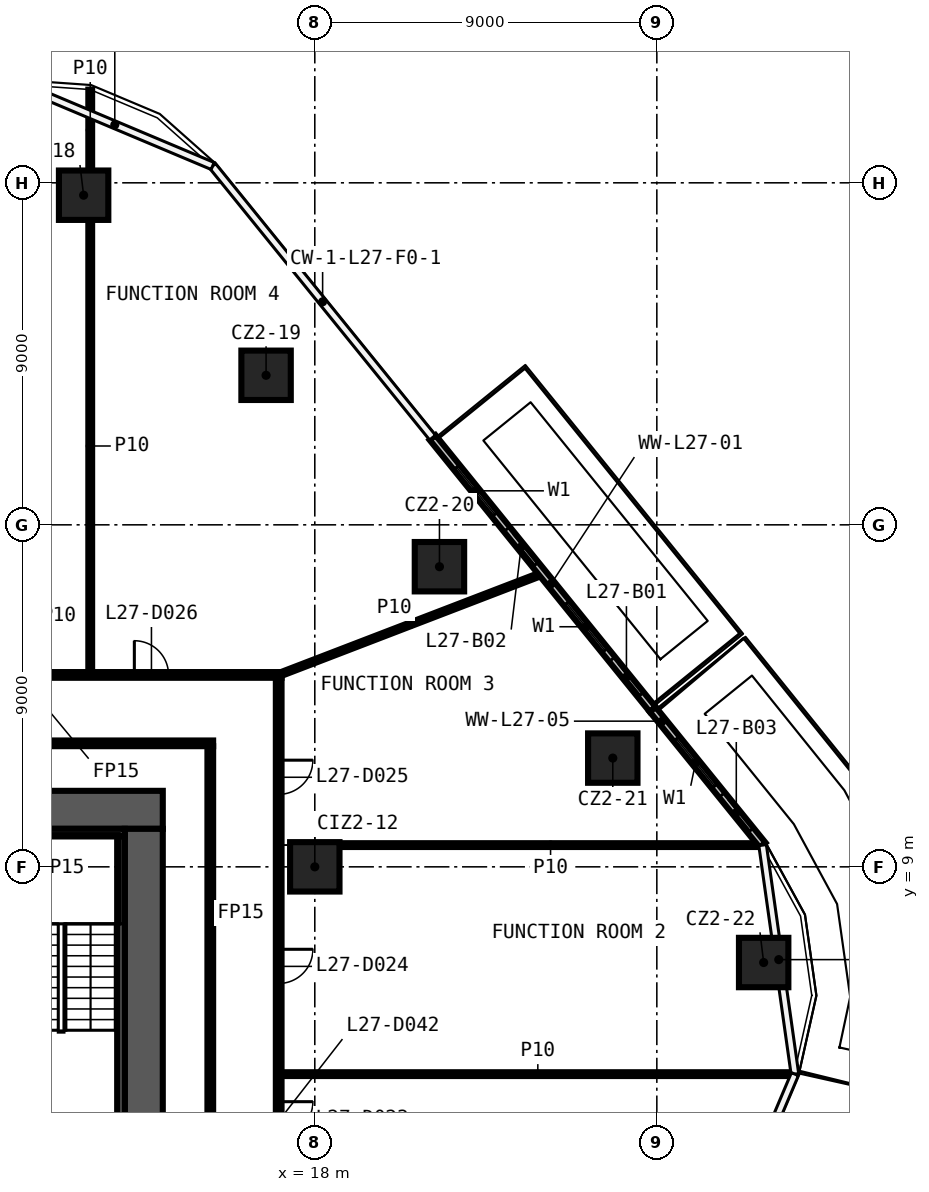
"""IFC4 building model, lengths in metres.
Left out: names, types, materials, properties, quantities, classifications, styles, units other than length and angle.
Written with IfcOpenShell. Run it as: python <this file> out.ifc"""

import sys

from ifc_helpers import new_model, si_unit, direction, frame, frame_2d, origin, origin_2d, place, context, subcontext, project, spatial, rectangle, extrude, element, fill, save


model = new_model("IFC4")
c1 = context("Model", 3, precision=1e-05, world=origin(), true_north=direction((0.0, 1.0)))
c2 = subcontext(c1, "Body", "Model", "MODEL_VIEW")
j1 = project(units=[si_unit("LENGTHUNIT", "METRE"), si_unit("PLANEANGLEUNIT", "RADIAN")], contexts=[c1])
p1 = place(None, origin())
s1 = spatial("IfcSite", under=j1, at=p1, CompositionType="ELEMENT")
p2 = place(p1, origin())
s2 = spatial("IfcBuilding", under=s1, at=p2, CompositionType="ELEMENT")
p3 = place(p2, frame((0.0, 0.0, 124.8)))
s3 = spatial("IfcBuildingStorey", under=s2, at=p3, CompositionType="ELEMENT", Elevation=124.8)
for number, where, z_axis, x_axis in (
    (1, (11.917, 26.674, 0.0), (0.0, 0.0, 1.0), (1.0, 0.0, 0.0)),
    (2, (16.718, 21.935, 0.0), (0.0, 0.0, 1.0), (1.0, 0.0, 0.0)),
    (3, (21.28, 16.898, 0.0), (0.0, 0.0, 1.0), (1.0, 0.0, 0.0)),
    (4, (25.841, 11.862, 0.0), (0.0, 0.0, 1.0), (1.0, 0.0, 0.0)),
    (5, (29.811, 6.482, 0.0), (0.0, 0.0, 1.0), (1.0, 0.0, 0.0)),
    (6, (18.0, 9.0, 0.0), (0.0, 0.0, 1.0), (1.0, 0.0, 0.0)),
):
    element("IfcColumn", number, at=place(p3, frame(where, z_axis=z_axis, x_axis=x_axis)), inside=s3, PredefinedType="COLUMN", context=c2, shape_type="SweptSolid", body=[
        extrude(rectangle(XDim=1.3, YDim=1.3, at=origin_2d()), origin(), (0.0, 0.0, 1.0), 3.3),
    ])
p4 = place(p3, frame((17.125, 3.545, 0.0), z_axis=(0.0, 0.0, 1.0), x_axis=(1.0, 0.0, 0.0)))
e7 = element("IfcWall", 7, at=p4, inside=s3, PredefinedType="PARTITIONING", context=c2, shape_type="SweptSolid", body=[
    extrude(rectangle(XDim=13.487, YDim=0.1, at=frame_2d((6.743, 0.0))), origin(), (0.0, 0.0, 1.0), 3.3),
])
p5 = place(p3, frame((18.65, 9.572, 0.0), z_axis=(0.0, 0.0, 1.0), x_axis=(1.0, 0.0, 0.0)))
e8 = element("IfcWall", 8, at=p5, inside=s3, PredefinedType="PARTITIONING", context=c2, shape_type="SweptSolid", body=[
    extrude(rectangle(XDim=11.107, YDim=0.1, at=frame_2d((5.554, 0.0))), origin(), (0.0, 0.0, 1.0), 3.3),
])
p6 = place(p3, frame((3.525, 12.25, 0.0), z_axis=(0.0, 0.0, 1.0), x_axis=(1.0, 0.0, 0.0)))
e9 = element("IfcWall", 9, at=p6, inside=s3, PredefinedType="PARTITIONING", context=c2, shape_type="SweptSolid", body=[
    extrude(rectangle(XDim=11.8, YDim=0.15, at=frame_2d((5.9, 0.0))), origin(), (0.0, 0.0, 1.0), 3.3),
])
p7 = place(p3, frame((-17.125, 14.05, 0.0), z_axis=(0.0, 0.0, 1.0), x_axis=(1.0, 0.0, 0.0)))
e10 = element("IfcWall", 10, at=p7, inside=s3, PredefinedType="PARTITIONING", context=c2, shape_type="SweptSolid", body=[
    extrude(rectangle(XDim=34.25, YDim=0.15, at=frame_2d((17.125, 0.0))), origin(), (0.0, 0.0, 1.0), 3.3),
])
p8 = place(p7, frame((30.377, 0.0, 0.0)))
e11 = element("IfcOpeningElement", 11, at=p8, cuts=e10, PredefinedType="OPENING", context=c2, shape_type="SweptSolid", body=[
    extrude(rectangle(XDim=0.9, YDim=2.1, at=frame_2d((0.45, 1.05))), frame((0.0, 0.085, 0.0), z_axis=(0.0, -1.0, 0.0), x_axis=(1.0, 0.0, 0.0)), (0.0, 0.0, 1.0), 0.17),
])
p9 = place(p7, frame((23.321, 0.0, 0.0)))
e12 = element("IfcOpeningElement", 12, at=p9, cuts=e10, PredefinedType="OPENING", context=c2, shape_type="SweptSolid", body=[
    extrude(rectangle(XDim=1.0, YDim=2.1, at=frame_2d((0.5, 1.05))), frame((0.0, 0.085, 0.0), z_axis=(0.0, -1.0, 0.0), x_axis=(1.0, 0.0, 0.0)), (0.0, 0.0, 1.0), 0.17),
])
p10 = place(p7, frame((21.183, 0.0, 0.0)))
e13 = element("IfcOpeningElement", 13, at=p10, cuts=e10, PredefinedType="OPENING", context=c2, shape_type="SweptSolid", body=[
    extrude(rectangle(XDim=1.0, YDim=2.1, at=frame_2d((0.5, 1.05))), frame((0.0, 0.085, 0.0), z_axis=(0.0, -1.0, 0.0), x_axis=(1.0, 0.0, 0.0)), (0.0, 0.0, 1.0), 0.17),
])
p11 = place(p7, frame((14.241, 0.0, 0.0)))
e14 = element("IfcOpeningElement", 14, at=p11, cuts=e10, PredefinedType="OPENING", context=c2, shape_type="SweptSolid", body=[
    extrude(rectangle(XDim=1.0, YDim=2.1, at=frame_2d((0.5, 1.05))), frame((0.0, 0.085, 0.0), z_axis=(0.0, -1.0, 0.0), x_axis=(1.0, 0.0, 0.0)), (0.0, 0.0, 1.0), 0.17),
])
p12 = place(p7, frame((12.099, 0.0, 0.0)))
e15 = element("IfcOpeningElement", 15, at=p12, cuts=e10, PredefinedType="OPENING", context=c2, shape_type="SweptSolid", body=[
    extrude(rectangle(XDim=1.0, YDim=2.1, at=frame_2d((0.5, 1.05))), frame((0.0, 0.085, 0.0), z_axis=(0.0, -1.0, 0.0), x_axis=(1.0, 0.0, 0.0)), (0.0, 0.0, 1.0), 0.17),
])
p13 = place(p7, frame((5.161, 0.0, 0.0)))
e16 = element("IfcOpeningElement", 16, at=p13, cuts=e10, PredefinedType="OPENING", context=c2, shape_type="SweptSolid", body=[
    extrude(rectangle(XDim=1.0, YDim=2.1, at=frame_2d((0.5, 1.05))), frame((0.0, 0.085, 0.0), z_axis=(0.0, -1.0, 0.0), x_axis=(1.0, 0.0, 0.0)), (0.0, 0.0, 1.0), 0.17),
])
p14 = place(p7, frame((2.406, 0.0, 0.0)))
e17 = element("IfcOpeningElement", 17, at=p14, cuts=e10, PredefinedType="OPENING", context=c2, shape_type="SweptSolid", body=[
    extrude(rectangle(XDim=0.9, YDim=2.1, at=frame_2d((0.45, 1.05))), frame((0.0, 0.085, 0.0), z_axis=(0.0, -1.0, 0.0), x_axis=(1.0, 0.0, 0.0)), (0.0, 0.0, 1.0), 0.17),
])
p15 = place(p3, frame((17.05, 14.05, 0.0), z_axis=(0.0, 0.0, 1.0), x_axis=(0.933461735893, 0.358676996228, 0.0)))
e18 = element("IfcWall", 18, at=p15, inside=s3, PredefinedType="PARTITIONING", context=c2, shape_type="SweptSolid", body=[
    extrude(rectangle(XDim=7.42, YDim=0.1, at=frame_2d((3.71, 0.0))), origin(), (0.0, 0.0, 1.0), 3.3),
])
p16 = place(p3, frame((17.05, 13.975, 0.0), z_axis=(0.0, 0.0, 1.0), x_axis=(0.0, -1.0, 0.0)))
e19 = element("IfcWall", 19, at=p16, inside=s3, PredefinedType="PARTITIONING", context=c2, shape_type="SweptSolid", body=[
    extrude(rectangle(XDim=27.95, YDim=0.15, at=frame_2d((13.975, 0.0))), origin(), (0.0, 0.0, 1.0), 3.3),
])
p17 = place(p16, frame((25.545, 0.0, 0.0)))
e20 = element("IfcOpeningElement", 20, at=p17, cuts=e19, PredefinedType="OPENING", context=c2, shape_type="SweptSolid", body=[
    extrude(rectangle(XDim=1.0, YDim=2.1, at=frame_2d((0.5, 1.05))), frame((0.0, 0.085, 0.0), z_axis=(0.0, -1.0, 0.0), x_axis=(1.0, 0.0, 0.0)), (0.0, 0.0, 1.0), 0.17),
])
p18 = place(p16, frame((19.024, 0.0, 0.0)))
e21 = element("IfcOpeningElement", 21, at=p18, cuts=e19, PredefinedType="OPENING", context=c2, shape_type="SweptSolid", body=[
    extrude(rectangle(XDim=1.0, YDim=2.1, at=frame_2d((0.5, 1.05))), frame((0.0, 0.085, 0.0), z_axis=(0.0, -1.0, 0.0), x_axis=(1.0, 0.0, 0.0)), (0.0, 0.0, 1.0), 0.17),
])
p19 = place(p16, frame((17.303, 0.0, 0.0)))
e22 = element("IfcOpeningElement", 22, at=p19, cuts=e19, PredefinedType="OPENING", context=c2, shape_type="SweptSolid", body=[
    extrude(rectangle(XDim=1.0, YDim=2.1, at=frame_2d((0.5, 1.05))), frame((0.0, 0.085, 0.0), z_axis=(0.0, -1.0, 0.0), x_axis=(1.0, 0.0, 0.0)), (0.0, 0.0, 1.0), 0.17),
])
p20 = place(p16, frame((11.155, 0.0, 0.0)))
e23 = element("IfcOpeningElement", 23, at=p20, cuts=e19, PredefinedType="OPENING", context=c2, shape_type="SweptSolid", body=[
    extrude(rectangle(XDim=0.9, YDim=2.1, at=frame_2d((0.45, 1.05))), frame((0.0, 0.085, 0.0), z_axis=(0.0, -1.0, 0.0), x_axis=(1.0, 0.0, 0.0)), (0.0, 0.0, 1.0), 0.17),
])
p21 = place(p16, frame((7.145, 0.0, 0.0)))
e24 = element("IfcOpeningElement", 24, at=p21, cuts=e19, PredefinedType="OPENING", context=c2, shape_type="SweptSolid", body=[
    extrude(rectangle(XDim=0.9, YDim=2.1, at=frame_2d((0.45, 1.05))), frame((0.0, 0.085, 0.0), z_axis=(0.0, -1.0, 0.0), x_axis=(1.0, 0.0, 0.0)), (0.0, 0.0, 1.0), 0.17),
])
p22 = place(p16, frame((2.168, 0.0, 0.0)))
e25 = element("IfcOpeningElement", 25, at=p22, cuts=e19, PredefinedType="OPENING", context=c2, shape_type="SweptSolid", body=[
    extrude(rectangle(XDim=0.9, YDim=2.1, at=frame_2d((0.45, 1.05))), frame((0.0, 0.085, 0.0), z_axis=(0.0, -1.0, 0.0), x_axis=(1.0, 0.0, 0.0)), (0.0, 0.0, 1.0), 0.17),
])
p23 = place(p3, frame((15.25, -12.175, 0.0), z_axis=(0.0, 0.0, 1.0), x_axis=(0.0, 1.0, 0.0)))
e26 = element("IfcWall", 26, at=p23, inside=s3, PredefinedType="PARTITIONING", context=c2, shape_type="SweptSolid", body=[
    extrude(rectangle(XDim=24.35, YDim=0.15, at=frame_2d((12.175, 0.0))), origin(), (0.0, 0.0, 1.0), 3.3),
])
p24 = place(p23, frame((11.725, 0.0, 0.0)))
e27 = element("IfcOpeningElement", 27, at=p24, cuts=e26, PredefinedType="OPENING", context=c2, shape_type="SweptSolid", body=[
    extrude(rectangle(XDim=0.9, YDim=2.1, at=frame_2d((0.45, 1.05))), frame((0.0, 0.085, 0.0), z_axis=(0.0, -1.0, 0.0), x_axis=(1.0, 0.0, 0.0)), (0.0, 0.0, 1.0), 0.17),
])
p25 = place(p3, frame((12.091, 14.125, 0.0), z_axis=(0.0, 0.0, 1.0), x_axis=(0.0, 1.0, 0.0)))
e28 = element("IfcWall", 28, at=p25, inside=s3, PredefinedType="PARTITIONING", context=c2, shape_type="SweptSolid", body=[
    extrude(rectangle(XDim=11.899, YDim=0.1, at=frame_2d((5.949, 0.0))), origin(), (0.0, 0.0, 1.0), 3.3),
])
p26 = place(p3, frame((12.091, 27.324, 0.0), z_axis=(0.0, 0.0, 1.0), x_axis=(0.0, 1.0, 0.0)))
e29 = element("IfcWall", 29, at=p26, inside=s3, PredefinedType="PARTITIONING", context=c2, shape_type="SweptSolid", body=[
    extrude(rectangle(XDim=2.128, YDim=0.1, at=frame_2d((1.064, 0.0))), origin(), (0.0, 0.0, 1.0), 3.3),
])
p27 = place(p3, frame((26.892, 13.142, 0.0), z_axis=(0.0, 0.0, 1.0), x_axis=(-0.629299699172, 0.777162716953, 0.0)))
e30 = element("IfcWall", 30, at=p27, inside=s3, PredefinedType="SOLIDWALL", context=c2, shape_type="SweptSolid", body=[
    extrude(rectangle(XDim=9.205, YDim=0.2, at=frame_2d((4.603, 0.0))), origin(), (0.0, 0.0, 1.0), 3.3),
])
p28 = place(p27, frame((2.0, 0.0, 0.6)))
e31 = element("IfcOpeningElement", 31, at=p28, cuts=e30, PredefinedType="OPENING", context=c2, shape_type="SweptSolid", body=[
    extrude(rectangle(XDim=1.6, YDim=2.4, at=frame_2d((0.8, 1.2))), frame((0.0, 0.11, 0.0), z_axis=(0.0, -1.0, 0.0), x_axis=(1.0, 0.0, 0.0)), (0.0, 0.0, 1.0), 0.22),
])
p29 = place(p27, frame((0.5, 0.0, 0.0)))
e32 = element("IfcOpeningElement", 32, at=p29, cuts=e30, PredefinedType="OPENING", context=c2, shape_type="SweptSolid", body=[
    extrude(rectangle(XDim=1.2, YDim=2.4, at=frame_2d((0.6, 1.2))), frame((0.0, 0.11, 0.0), z_axis=(0.0, -1.0, 0.0), x_axis=(1.0, 0.0, 0.0)), (0.0, 0.0, 1.0), 0.22),
])
p30 = place(p27, frame((6.603, 0.0, 0.6)))
e33 = element("IfcOpeningElement", 33, at=p30, cuts=e30, PredefinedType="OPENING", context=c2, shape_type="SweptSolid", body=[
    extrude(rectangle(XDim=1.6, YDim=2.4, at=frame_2d((0.8, 1.2))), frame((0.0, 0.11, 0.0), z_axis=(0.0, -1.0, 0.0), x_axis=(1.0, 0.0, 0.0)), (0.0, 0.0, 1.0), 0.22),
])
p31 = place(p27, frame((4.903, 0.0, 0.0)))
e34 = element("IfcOpeningElement", 34, at=p31, cuts=e30, PredefinedType="OPENING", context=c2, shape_type="SweptSolid", body=[
    extrude(rectangle(XDim=1.2, YDim=2.4, at=frame_2d((0.6, 1.2))), frame((0.0, 0.11, 0.0), z_axis=(0.0, -1.0, 0.0), x_axis=(1.0, 0.0, 0.0)), (0.0, 0.0, 1.0), 0.22),
])
p32 = place(p3, frame((29.783, 9.572, 0.0), z_axis=(0.0, 0.0, 1.0), x_axis=(-0.629299136059, 0.777163172928, 0.0)))
e35 = element("IfcWall", 35, at=p32, inside=s3, PredefinedType="SOLIDWALL", context=c2, shape_type="SweptSolid", body=[
    extrude(rectangle(XDim=4.594, YDim=0.2, at=frame_2d((2.297, 0.0))), origin(), (0.0, 0.0, 1.0), 3.3),
])
p33 = place(p32, frame((2.0, 0.0, 0.6)))
e36 = element("IfcOpeningElement", 36, at=p33, cuts=e35, PredefinedType="OPENING", context=c2, shape_type="SweptSolid", body=[
    extrude(rectangle(XDim=1.6, YDim=2.4, at=frame_2d((0.8, 1.2))), frame((0.0, 0.11, 0.0), z_axis=(0.0, -1.0, 0.0), x_axis=(1.0, 0.0, 0.0)), (0.0, 0.0, 1.0), 0.22),
])
p34 = place(p32, frame((0.5, 0.0, 0.0)))
e37 = element("IfcOpeningElement", 37, at=p34, cuts=e35, PredefinedType="OPENING", context=c2, shape_type="SweptSolid", body=[
    extrude(rectangle(XDim=1.2, YDim=2.4, at=frame_2d((0.6, 1.2))), frame((0.0, 0.11, 0.0), z_axis=(0.0, -1.0, 0.0), x_axis=(1.0, 0.0, 0.0)), (0.0, 0.0, 1.0), 0.22),
])
p35 = place(p3, frame((-14.0, 10.5, 0.0), z_axis=(0.0, 0.0, 1.0), x_axis=(1.0, 0.0, 0.0)))
e38 = element("IfcWall", 38, at=p35, inside=s3, PredefinedType="SHEAR", context=c2, shape_type="SweptSolid", body=[
    extrude(rectangle(XDim=28.0, YDim=1.0, at=frame_2d((14.0, 0.0))), origin(), (0.0, 0.0, 1.0), 3.3),
])
p36 = place(p35, frame((15.9, 0.0, 0.0)))
e39 = element("IfcOpeningElement", 39, at=p36, cuts=e38, PredefinedType="OPENING", context=c2, shape_type="SweptSolid", body=[
    extrude(rectangle(XDim=1.6, YDim=2.1, at=frame_2d((0.8, 1.05))), frame((0.0, 0.51, 0.0), z_axis=(0.0, -1.0, 0.0), x_axis=(1.0, 0.0, 0.0)), (0.0, 0.0, 1.0), 1.02),
])
p37 = place(p3, frame((13.5, 10.0, 0.0), z_axis=(0.0, 0.0, 1.0), x_axis=(0.0, -1.0, 0.0)))
e40 = element("IfcWall", 40, at=p37, inside=s3, PredefinedType="SHEAR", context=c2, shape_type="SweptSolid", body=[
    extrude(rectangle(XDim=20.0, YDim=1.0, at=frame_2d((10.0, 0.0))), origin(), (0.0, 0.0, 1.0), 3.3),
])
p38 = place(p3, frame((3.9, 9.9, 0.0), z_axis=(0.0, 0.0, 1.0), x_axis=(1.0, 0.0, 0.0)))
e41 = element("IfcWall", 41, at=p38, inside=s3, PredefinedType="SHEAR", context=c2, shape_type="SweptSolid", body=[
    extrude(rectangle(XDim=9.1, YDim=0.2, at=frame_2d((4.55, 0.0))), origin(), (0.0, 0.0, 1.0), 3.3),
])
p39 = place(p3, frame((12.9, 9.8, 0.0), z_axis=(0.0, 0.0, 1.0), x_axis=(0.0, -1.0, 0.0)))
e42 = element("IfcWall", 42, at=p39, inside=s3, PredefinedType="SHEAR", context=c2, shape_type="SweptSolid", body=[
    extrude(rectangle(XDim=19.6, YDim=0.2, at=frame_2d((9.8, 0.0))), origin(), (0.0, 0.0, 1.0), 3.3),
])
p40 = place(p20, origin())
e43 = element("IfcDoor", 43, at=p40, inside=s3, OperationType="SINGLE_SWING_RIGHT", PredefinedType="DOOR", context=c2, shape_type="SweptSolid", body=[
    extrude(rectangle(XDim=0.9, YDim=2.1, at=frame_2d((0.45, 1.05))), frame((0.0, 0.025, 0.0), z_axis=(0.0, -1.0, 0.0), x_axis=(1.0, 0.0, 0.0)), (0.0, 0.0, 1.0), 0.05),
])
fill(e23, e43)
p41 = place(p21, origin())
e44 = element("IfcDoor", 44, at=p41, inside=s3, OperationType="SINGLE_SWING_LEFT", PredefinedType="DOOR", context=c2, shape_type="SweptSolid", body=[
    extrude(rectangle(XDim=0.9, YDim=2.1, at=frame_2d((0.45, 1.05))), frame((0.0, 0.025, 0.0), z_axis=(0.0, -1.0, 0.0), x_axis=(1.0, 0.0, 0.0)), (0.0, 0.0, 1.0), 0.05),
])
fill(e24, e44)
p42 = place(p22, origin())
e45 = element("IfcDoor", 45, at=p42, inside=s3, OperationType="SINGLE_SWING_RIGHT", PredefinedType="DOOR", context=c2, shape_type="SweptSolid", body=[
    extrude(rectangle(XDim=0.9, YDim=2.1, at=frame_2d((0.45, 1.05))), frame((0.0, 0.025, 0.0), z_axis=(0.0, -1.0, 0.0), x_axis=(1.0, 0.0, 0.0)), (0.0, 0.0, 1.0), 0.05),
])
fill(e25, e45)
p43 = place(p8, origin())
e46 = element("IfcDoor", 46, at=p43, inside=s3, OperationType="SINGLE_SWING_LEFT", PredefinedType="DOOR", context=c2, shape_type="SweptSolid", body=[
    extrude(rectangle(XDim=0.9, YDim=2.1, at=frame_2d((0.45, 1.05))), frame((0.0, 0.025, 0.0), z_axis=(0.0, -1.0, 0.0), x_axis=(1.0, 0.0, 0.0)), (0.0, 0.0, 1.0), 0.05),
])
fill(e11, e46)
p44 = place(p28, origin())
e47 = element("IfcWindow", 47, at=p44, inside=s3, PartitioningType="SINGLE_PANEL", PredefinedType="WINDOW", context=c2, shape_type="SweptSolid", body=[
    extrude(rectangle(XDim=1.6, YDim=2.4, at=frame_2d((0.8, 1.2))), frame((0.0, 0.03, 0.0), z_axis=(0.0, -1.0, 0.0), x_axis=(1.0, 0.0, 0.0)), (0.0, 0.0, 1.0), 0.06),
])
fill(e31, e47)
p45 = place(p29, origin())
e48 = element("IfcDoor", 48, at=p45, inside=s3, OperationType="SLIDING_TO_LEFT", PredefinedType="DOOR", context=c2, shape_type="SweptSolid", body=[
    extrude(rectangle(XDim=1.2, YDim=2.4, at=frame_2d((0.6, 1.2))), frame((0.0, 0.025, 0.0), z_axis=(0.0, -1.0, 0.0), x_axis=(1.0, 0.0, 0.0)), (0.0, 0.0, 1.0), 0.05),
])
fill(e32, e48)
p46 = place(p30, origin())
e49 = element("IfcWindow", 49, at=p46, inside=s3, PartitioningType="SINGLE_PANEL", PredefinedType="WINDOW", context=c2, shape_type="SweptSolid", body=[
    extrude(rectangle(XDim=1.6, YDim=2.4, at=frame_2d((0.8, 1.2))), frame((0.0, 0.03, 0.0), z_axis=(0.0, -1.0, 0.0), x_axis=(1.0, 0.0, 0.0)), (0.0, 0.0, 1.0), 0.06),
])
fill(e33, e49)
p47 = place(p31, origin())
e50 = element("IfcDoor", 50, at=p47, inside=s3, OperationType="SLIDING_TO_LEFT", PredefinedType="DOOR", context=c2, shape_type="SweptSolid", body=[
    extrude(rectangle(XDim=1.2, YDim=2.4, at=frame_2d((0.6, 1.2))), frame((0.0, 0.025, 0.0), z_axis=(0.0, -1.0, 0.0), x_axis=(1.0, 0.0, 0.0)), (0.0, 0.0, 1.0), 0.05),
])
fill(e34, e50)
p48 = place(p33, origin())
e51 = element("IfcWindow", 51, at=p48, inside=s3, PartitioningType="SINGLE_PANEL", PredefinedType="WINDOW", context=c2, shape_type="SweptSolid", body=[
    extrude(rectangle(XDim=1.6, YDim=2.4, at=frame_2d((0.8, 1.2))), frame((0.0, 0.03, 0.0), z_axis=(0.0, -1.0, 0.0), x_axis=(1.0, 0.0, 0.0)), (0.0, 0.0, 1.0), 0.06),
])
fill(e36, e51)
p49 = place(p34, origin())
e52 = element("IfcDoor", 52, at=p49, inside=s3, OperationType="SLIDING_TO_LEFT", PredefinedType="DOOR", context=c2, shape_type="SweptSolid", body=[
    extrude(rectangle(XDim=1.2, YDim=2.4, at=frame_2d((0.6, 1.2))), frame((0.0, 0.025, 0.0), z_axis=(0.0, -1.0, 0.0), x_axis=(1.0, 0.0, 0.0)), (0.0, 0.0, 1.0), 0.05),
])
fill(e37, e52)
save(model, sys.argv[1])
